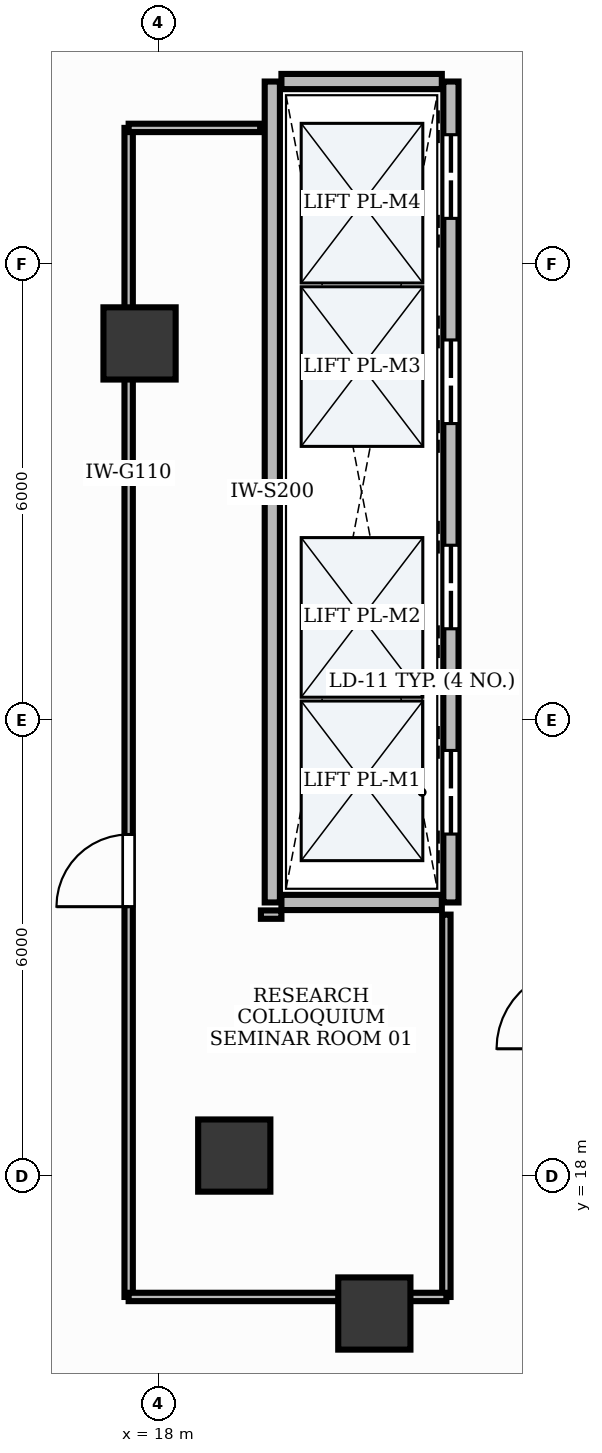
"""IFC4 building model, lengths in metres.
Left out: names, types, materials, properties, quantities, classifications, styles, units other than length and angle.
Written with IfcOpenShell. Run it as: python <this file> out.ifc"""

import sys

from ifc_helpers import new_model, si_unit, direction, frame, frame_2d, origin, origin_2d, place, context, subcontext, project, spatial, rectangle, extrude, element, fill, save


model = new_model("IFC4")
c1 = context("Model", 3, precision=1e-05, world=origin(), true_north=direction((0.0, 1.0)))
c2 = subcontext(c1, "Body", "Model", "MODEL_VIEW")
j1 = project(units=[si_unit("LENGTHUNIT", "METRE"), si_unit("PLANEANGLEUNIT", "RADIAN")], contexts=[c1])
p1 = place(None, origin())
s1 = spatial("IfcSite", under=j1, at=p1, CompositionType="ELEMENT")
p2 = place(p1, origin())
s2 = spatial("IfcBuilding", under=s1, at=p2, CompositionType="ELEMENT")
p3 = place(p2, frame((0.0, 0.0, 166.8)))
s3 = spatial("IfcBuildingStorey", under=s2, at=p3, CompositionType="ELEMENT", Elevation=166.8)
for number, where, z_axis, x_axis in (
    (1, (17.753, 28.955, -0.0), (0.0, 0.0, 1.0), (1.0, 0.0, 0.0)),
    (2, (19.0, 18.27, -0.0), (0.0, 0.0, 1.0), (1.0, 0.0, 0.0)),
    (3, (20.842, 16.192, -0.0), (0.0, 0.0, 1.0), (1.0, 0.0, 0.0)),
):
    element("IfcColumn", number, at=place(p3, frame(where, z_axis=z_axis, x_axis=x_axis)), inside=s3, PredefinedType="COLUMN", context=c2, shape_type="SweptSolid", body=[
        extrude(rectangle(XDim=0.95, YDim=0.95, at=origin_2d()), origin(), (0.0, 0.0, 1.0), 3.901),
    ])
p4 = place(p3, frame((19.5, 21.6, 0.0), z_axis=(0.0, 0.0, 1.0), x_axis=(0.0, 1.0, 0.0)))
e4 = element("IfcWall", 4, at=p4, inside=s3, PredefinedType="PARTITIONING", context=c2, shape_type="SweptSolid", body=[
    extrude(rectangle(XDim=10.8, YDim=0.2, at=frame_2d((5.4, 0.0))), origin(), (0.0, 0.0, 1.0), 2.91),
])
p5 = place(p3, frame((21.85, 21.6, 0.0), z_axis=(0.0, 0.0, 1.0), x_axis=(0.0, 1.0, 0.0)))
e5 = element("IfcWall", 5, at=p5, inside=s3, PredefinedType="PARTITIONING", context=c2, shape_type="SweptSolid", body=[
    extrude(rectangle(XDim=10.8, YDim=0.2, at=frame_2d((5.4, 0.0))), origin(), (0.0, 0.0, 1.0), 2.91),
])
p6 = place(p5, frame((0.9, 0.0, 0.0)))
e6 = element("IfcOpeningElement", 6, at=p6, cuts=e5, PredefinedType="OPENING", context=c2, shape_type="SweptSolid", body=[
    extrude(rectangle(XDim=1.1, YDim=2.2, at=frame_2d((0.55, 1.1))), frame((0.0, 0.115, 0.0), z_axis=(0.0, -1.0, 0.0), x_axis=(1.0, 0.0, 0.0)), (0.0, 0.0, 1.0), 0.23),
])
p7 = place(p5, frame((3.6, 0.0, 0.0)))
e7 = element("IfcOpeningElement", 7, at=p7, cuts=e5, PredefinedType="OPENING", context=c2, shape_type="SweptSolid", body=[
    extrude(rectangle(XDim=1.1, YDim=2.2, at=frame_2d((0.55, 1.1))), frame((0.0, 0.115, 0.0), z_axis=(0.0, -1.0, 0.0), x_axis=(1.0, 0.0, 0.0)), (0.0, 0.0, 1.0), 0.23),
])
p8 = place(p5, frame((6.3, 0.0, 0.0)))
e8 = element("IfcOpeningElement", 8, at=p8, cuts=e5, PredefinedType="OPENING", context=c2, shape_type="SweptSolid", body=[
    extrude(rectangle(XDim=1.1, YDim=2.2, at=frame_2d((0.55, 1.1))), frame((0.0, 0.115, 0.0), z_axis=(0.0, -1.0, 0.0), x_axis=(1.0, 0.0, 0.0)), (0.0, 0.0, 1.0), 0.23),
])
p9 = place(p5, frame((9.0, 0.0, 0.0)))
e9 = element("IfcOpeningElement", 9, at=p9, cuts=e5, PredefinedType="OPENING", context=c2, shape_type="SweptSolid", body=[
    extrude(rectangle(XDim=1.1, YDim=2.2, at=frame_2d((0.55, 1.1))), frame((0.0, 0.115, 0.0), z_axis=(0.0, -1.0, 0.0), x_axis=(1.0, 0.0, 0.0)), (0.0, 0.0, 1.0), 0.23),
])
for number, where, z_axis, x_axis in (
    (10, (19.62, 21.6, 0.0), (0.0, 0.0, 1.0), (1.0, 0.0, 0.0)),
    (11, (19.62, 32.4, 0.0), (0.0, 0.0, 1.0), (1.0, 0.0, 0.0)),
):
    element("IfcWall", number, at=place(p3, frame(where, z_axis=z_axis, x_axis=x_axis)), inside=s3, PredefinedType="PARTITIONING", context=c2, shape_type="SweptSolid", body=[
        extrude(rectangle(XDim=2.11, YDim=0.2, at=frame_2d((1.055, 0.0))), origin(), (0.0, 0.0, 1.0), 2.91),
    ])
p10 = place(p3, frame((17.61, 16.41, 0.0), z_axis=(0.0, 0.0, 1.0), x_axis=(0.0, 1.0, 0.0)))
e12 = element("IfcWall", 12, at=p10, inside=s3, PredefinedType="MOVABLE", context=c2, shape_type="SweptSolid", body=[
    extrude(rectangle(XDim=15.38, YDim=0.11, at=frame_2d((7.69, 0.0))), origin(), (0.0, 0.0, 1.0), 2.91),
])
p11 = place(p10, frame((5.135, 0.0, 0.0)))
e13 = element("IfcOpeningElement", 13, at=p11, cuts=e12, PredefinedType="OPENING", context=c2, shape_type="SweptSolid", body=[
    extrude(rectangle(XDim=0.95, YDim=2.15, at=frame_2d((0.475, 1.075))), frame((0.0, 0.07, 0.0), z_axis=(0.0, -1.0, 0.0), x_axis=(1.0, 0.0, 0.0)), (0.0, 0.0, 1.0), 0.14),
])
p12 = place(p3, frame((19.35, 21.44, 0.0), z_axis=(0.0, 0.0, 1.0), x_axis=(1.0, 0.0, 0.0)))
e14 = element("IfcWall", 14, at=p12, inside=s3, PredefinedType="MOVABLE", context=c2, shape_type="SweptSolid", body=[
    extrude(rectangle(XDim=0.27, YDim=0.11, at=frame_2d((0.135, 0.0))), origin(), (0.0, 0.0, 1.0), 2.91),
])
p13 = place(p3, frame((21.79, 21.44, 0.0), z_axis=(0.0, 0.0, 1.0), x_axis=(0.0, -1.0, 0.0)))
e15 = element("IfcWall", 15, at=p13, inside=s3, PredefinedType="MOVABLE", context=c2, shape_type="SweptSolid", body=[
    extrude(rectangle(XDim=5.03, YDim=0.11, at=frame_2d((2.515, 0.0))), origin(), (0.0, 0.0, 1.0), 2.91),
])
p14 = place(p3, frame((21.79, 16.41, 0.0), z_axis=(0.0, 0.0, 1.0), x_axis=(-1.0, 0.0, 0.0)))
e16 = element("IfcWall", 16, at=p14, inside=s3, PredefinedType="MOVABLE", context=c2, shape_type="SweptSolid", body=[
    extrude(rectangle(XDim=4.18, YDim=0.11, at=frame_2d((2.09, 0.0))), origin(), (0.0, 0.0, 1.0), 2.91),
])
p15 = place(p3, frame((17.61, 31.79, 0.0), z_axis=(0.0, 0.0, 1.0), x_axis=(1.0, 0.0, 0.0)))
e17 = element("IfcWall", 17, at=p15, inside=s3, PredefinedType="MOVABLE", context=c2, shape_type="SweptSolid", body=[
    extrude(rectangle(XDim=1.73, YDim=0.11, at=frame_2d((0.865, 0.0))), origin(), (0.0, 0.0, 1.0), 2.91),
])
p16 = place(p6, origin())
e18 = element("IfcDoor", 18, at=p16, inside=s3, OperationType="DOUBLE_DOOR_SLIDING", PredefinedType="DOOR", context=c2, shape_type="SweptSolid", body=[
    extrude(rectangle(XDim=1.1, YDim=2.2, at=frame_2d((0.55, 1.1))), frame((0.0, 0.025, 0.0), z_axis=(0.0, -1.0, 0.0), x_axis=(1.0, 0.0, 0.0)), (0.0, 0.0, 1.0), 0.05),
])
fill(e6, e18)
p17 = place(p7, origin())
e19 = element("IfcDoor", 19, at=p17, inside=s3, OperationType="DOUBLE_DOOR_SLIDING", PredefinedType="DOOR", context=c2, shape_type="SweptSolid", body=[
    extrude(rectangle(XDim=1.1, YDim=2.2, at=frame_2d((0.55, 1.1))), frame((0.0, 0.025, 0.0), z_axis=(0.0, -1.0, 0.0), x_axis=(1.0, 0.0, 0.0)), (0.0, 0.0, 1.0), 0.05),
])
fill(e7, e19)
p18 = place(p8, origin())
e20 = element("IfcDoor", 20, at=p18, inside=s3, OperationType="DOUBLE_DOOR_SLIDING", PredefinedType="DOOR", context=c2, shape_type="SweptSolid", body=[
    extrude(rectangle(XDim=1.1, YDim=2.2, at=frame_2d((0.55, 1.1))), frame((0.0, 0.025, 0.0), z_axis=(0.0, -1.0, 0.0), x_axis=(1.0, 0.0, 0.0)), (0.0, 0.0, 1.0), 0.05),
])
fill(e8, e20)
p19 = place(p9, origin())
e21 = element("IfcDoor", 21, at=p19, inside=s3, OperationType="DOUBLE_DOOR_SLIDING", PredefinedType="DOOR", context=c2, shape_type="SweptSolid", body=[
    extrude(rectangle(XDim=1.1, YDim=2.2, at=frame_2d((0.55, 1.1))), frame((0.0, 0.025, 0.0), z_axis=(0.0, -1.0, 0.0), x_axis=(1.0, 0.0, 0.0)), (0.0, 0.0, 1.0), 0.05),
])
fill(e9, e21)
p20 = place(p11, origin())
e22 = element("IfcDoor", 22, at=p20, inside=s3, OperationType="SINGLE_SWING_LEFT", PredefinedType="DOOR", context=c2, shape_type="SweptSolid", body=[
    extrude(rectangle(XDim=0.95, YDim=2.15, at=frame_2d((0.475, 1.075))), frame((0.0, 0.025, 0.0), z_axis=(0.0, -1.0, 0.0), x_axis=(1.0, 0.0, 0.0)), (0.0, 0.0, 1.0), 0.05),
])
fill(e13, e22)
save(model, sys.argv[1])
